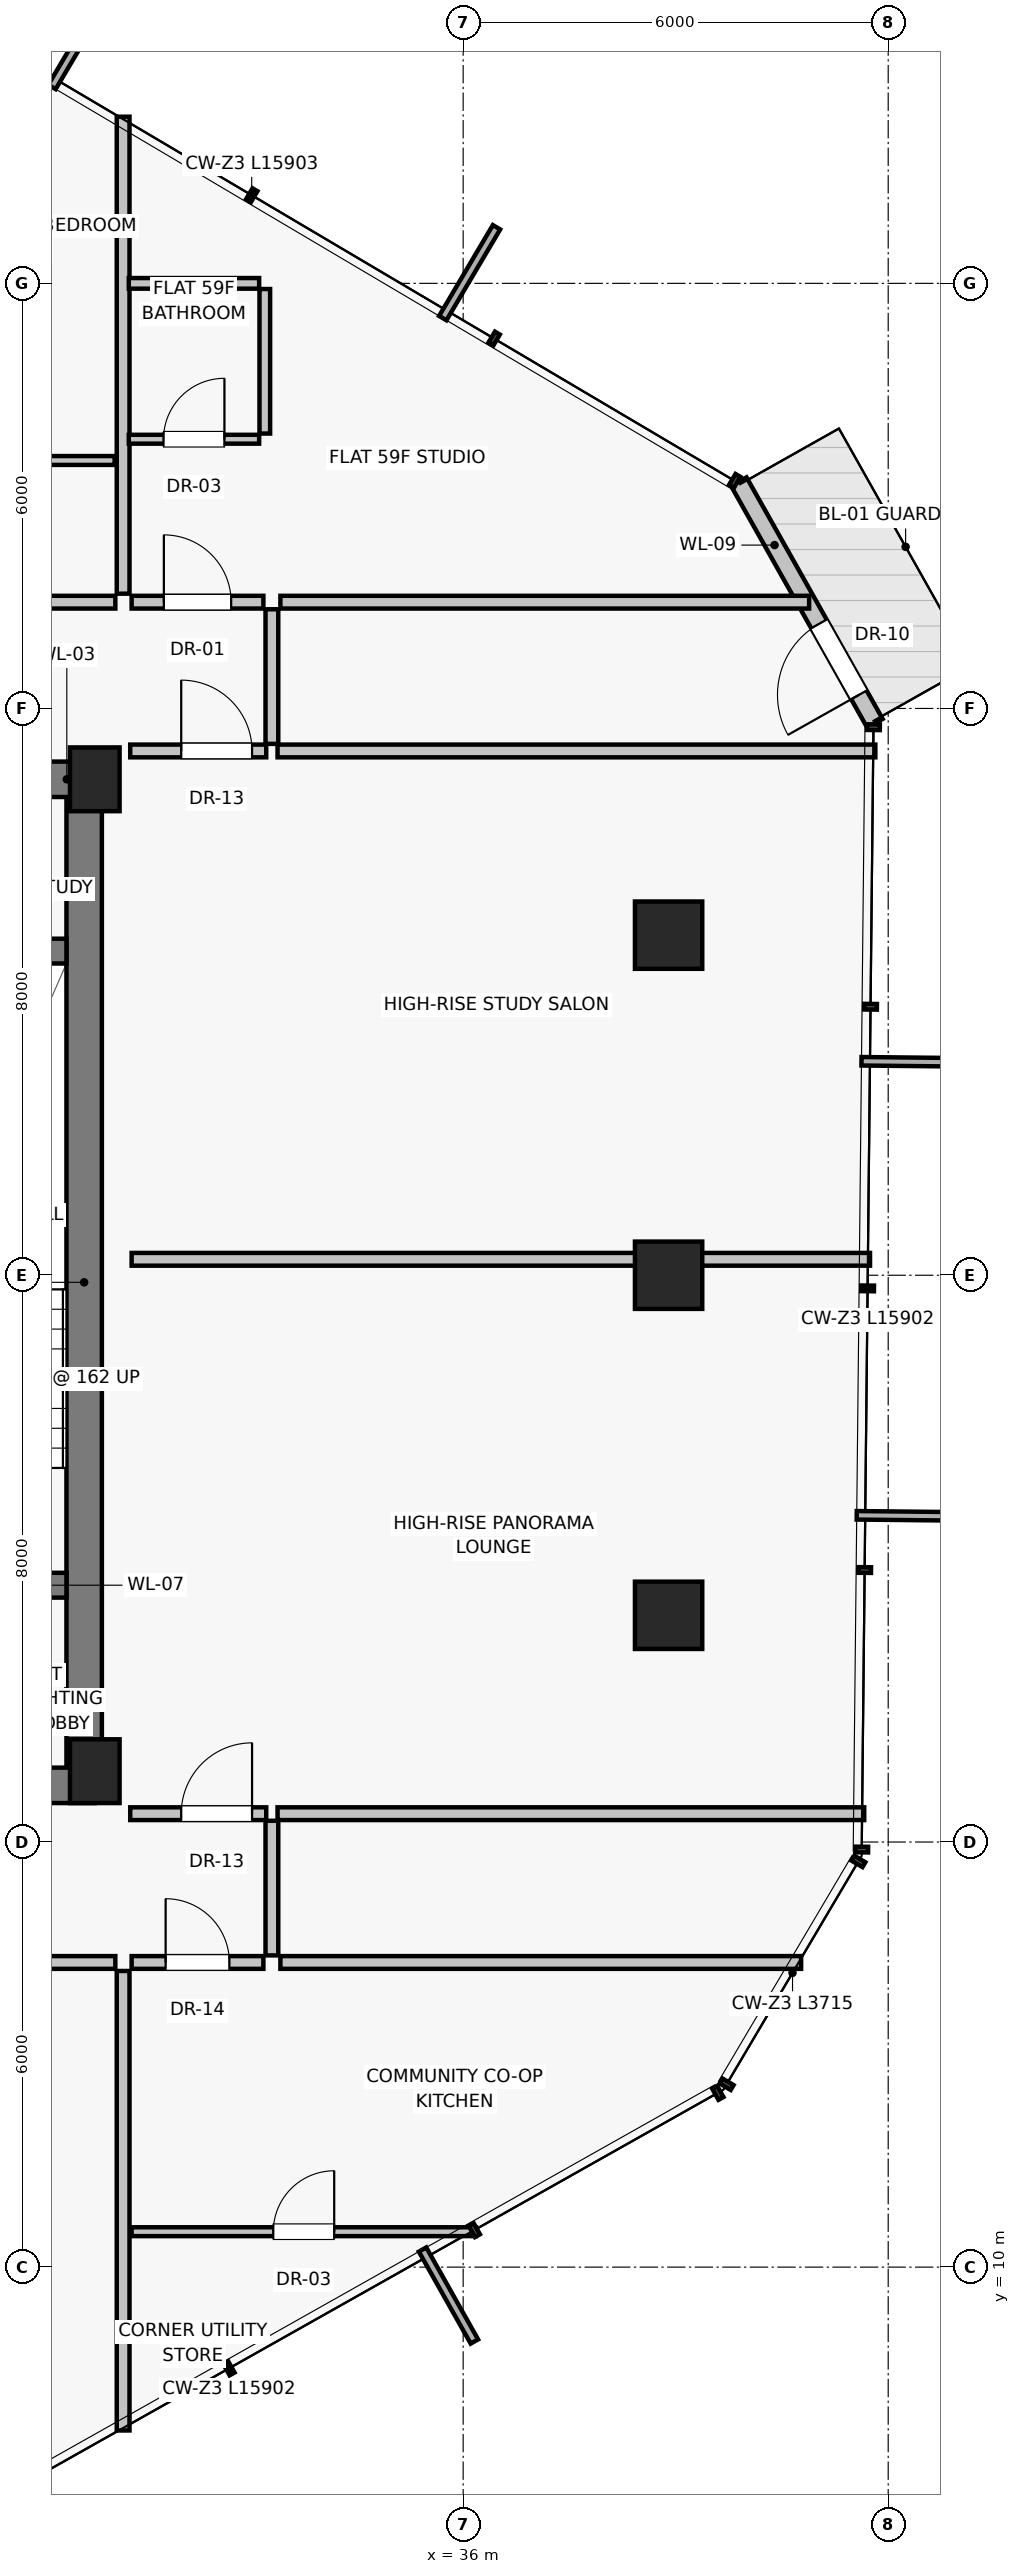
"""IFC4 building model, lengths in metres.
Left out: names, types, materials, properties, quantities, classifications, styles, units other than length and angle.
Written with IfcOpenShell. Run it as: python <this file> out.ifc"""

import sys

from ifc_helpers import new_model, si_unit, direction, frame, frame_2d, origin, origin_2d, place, context, subcontext, project, spatial, rectangle, extrude, source, transform, mapped, element, fill, save


model = new_model("IFC4")
c1 = context("Model", 3, precision=1e-05, world=origin(), true_north=direction((0.0, 1.0)))
c2 = subcontext(c1, "Body", "Model", "MODEL_VIEW")
j1 = project(units=[si_unit("LENGTHUNIT", "METRE"), si_unit("PLANEANGLEUNIT", "RADIAN")], contexts=[c1])
p1 = place(None, origin())
s1 = spatial("IfcSite", under=j1, at=p1, CompositionType="ELEMENT")
p2 = place(p1, origin())
s2 = spatial("IfcBuilding", under=s1, at=p2, CompositionType="ELEMENT")
p3 = place(p2, frame((0.0, 0.0, 208.1)))
s3 = spatial("IfcBuildingStorey", under=s2, at=p3, CompositionType="ELEMENT", Elevation=208.1)
for number, where, z_axis, x_axis in (
    (1, (30.8, 17.0, 0.0), (0.0, 0.0, 1.0), (1.0, 0.0, 0.0)),
    (2, (30.8, 31.0, 0.0), (0.0, 0.0, 1.0), (1.0, 0.0, 0.0)),
):
    element("IfcColumn", number, at=place(p3, frame(where, z_axis=z_axis, x_axis=x_axis)), inside=s3, PredefinedType="PILASTER", context=c2, shape_type="SweptSolid", body=[
        extrude(rectangle(XDim=0.7, YDim=0.9, at=origin_2d()), origin(), (0.0, 0.0, 1.0), 3.25),
    ])
for number, where, z_axis, x_axis in (
    (3, (38.9, 19.2, 0.0), (0.0, 0.0, 1.0), (1.0, 0.0, 0.0)),
    (4, (38.9, 24.0, 0.0), (0.0, 0.0, 1.0), (1.0, 0.0, 0.0)),
    (5, (38.9, 28.8, 0.0), (0.0, 0.0, 1.0), (1.0, 0.0, 0.0)),
):
    element("IfcColumn", number, at=place(p3, frame(where, z_axis=z_axis, x_axis=x_axis)), inside=s3, PredefinedType="COLUMN", context=c2, shape_type="SweptSolid", body=[
        extrude(rectangle(XDim=0.95, YDim=0.95, at=origin_2d()), origin(), (0.0, 0.0, 1.0), 3.25),
    ])
p4 = place(p3, frame((41.813, 31.791, 0.0), z_axis=(0.0, 0.0, 1.0), x_axis=(-0.490924417237, 0.871202167445, 0.0)))
e6 = element("IfcWall", 6, at=p4, inside=s3, PredefinedType="SOLIDWALL", context=c2, shape_type="SweptSolid", body=[
    extrude(rectangle(XDim=3.914, YDim=0.25, at=frame_2d((1.957, 0.0))), origin(), (0.0, 0.0, 1.0), 2.97),
])
p5 = place(p4, frame((0.46, 0.0, 0.0)))
e7 = element("IfcOpeningElement", 7, at=p5, cuts=e6, PredefinedType="OPENING", context=c2, shape_type="SweptSolid", body=[
    extrude(rectangle(XDim=1.15, YDim=2.25, at=frame_2d((0.575, 1.125))), frame((0.0, 0.135, 0.0), z_axis=(0.0, -1.0, 0.0), x_axis=(1.0, 0.0, 0.0)), (0.0, 0.0, 1.0), 0.27),
])
p6 = place(p3, frame((30.65, 16.8, 0.0), z_axis=(0.0, 0.0, 1.0), x_axis=(0.0, 1.0, 0.0)))
e8 = element("IfcWall", 8, at=p6, inside=s3, PredefinedType="SHEAR", context=c2, shape_type="SweptSolid", body=[
    extrude(rectangle(XDim=14.2, YDim=0.5, at=frame_2d((7.1, 0.0))), origin(), (0.0, 0.0, 1.0), 2.97),
])
p7 = place(p3, frame((24.95, 16.8, 0.0), z_axis=(0.0, 0.0, 1.0), x_axis=(1.0, 0.0, 0.0)))
e9 = element("IfcWall", 9, at=p7, inside=s3, PredefinedType="SHEAR", context=c2, shape_type="SweptSolid", body=[
    extrude(rectangle(XDim=5.85, YDim=0.5, at=frame_2d((2.925, 0.0))), origin(), (0.0, 0.0, 1.0), 2.97),
])
p8 = place(p7, frame((2.15, 0.0, 0.0)))
e10 = element("IfcOpeningElement", 10, at=p8, cuts=e9, PredefinedType="OPENING", context=c2, shape_type="SweptSolid", body=[
    extrude(rectangle(XDim=1.2, YDim=2.03, at=frame_2d((0.6, 1.015))), frame((0.0, 0.26, 0.0), z_axis=(0.0, -1.0, 0.0), x_axis=(1.0, 0.0, 0.0)), (0.0, 0.0, 1.0), 0.52),
])
p9 = place(p3, frame((27.0, 31.0, 0.0), z_axis=(0.0, 0.0, 1.0), x_axis=(1.0, 0.0, 0.0)))
e11 = element("IfcWall", 11, at=p9, inside=s3, PredefinedType="SHEAR", context=c2, shape_type="SweptSolid", body=[
    extrude(rectangle(XDim=3.8, YDim=0.5, at=frame_2d((1.9, 0.0))), origin(), (0.0, 0.0, 1.0), 2.97),
])
p10 = place(p9, frame((0.45, 0.0, 0.0)))
e12 = element("IfcOpeningElement", 12, at=p10, cuts=e11, PredefinedType="OPENING", context=c2, shape_type="SweptSolid", body=[
    extrude(rectangle(XDim=0.86, YDim=2.01, at=frame_2d((0.43, 1.005))), frame((0.0, 0.26, 0.0), z_axis=(0.0, -1.0, 0.0), x_axis=(1.0, 0.0, 0.0)), (0.0, 0.0, 1.0), 0.52),
])
p11 = place(p9, frame((1.9, 0.0, 0.0)))
e13 = element("IfcOpeningElement", 13, at=p11, cuts=e11, PredefinedType="OPENING", context=c2, shape_type="SweptSolid", body=[
    extrude(rectangle(XDim=0.86, YDim=2.01, at=frame_2d((0.43, 1.005))), frame((0.0, 0.26, 0.0), z_axis=(0.0, -1.0, 0.0), x_axis=(1.0, 0.0, 0.0)), (0.0, 0.0, 1.0), 0.52),
])
p12 = place(p3, frame((27.025, 19.625, 0.0), z_axis=(0.0, 0.0, 1.0), x_axis=(1.0, 0.0, 0.0)))
e14 = element("IfcWall", 14, at=p12, inside=s3, PredefinedType="SHEAR", context=c2, shape_type="SweptSolid", body=[
    extrude(rectangle(XDim=3.375, YDim=0.35, at=frame_2d((1.688, 0.0))), origin(), (0.0, 0.0, 1.0), 2.97),
])
p13 = place(p12, frame((1.05, 0.0, 0.0)))
e15 = element("IfcOpeningElement", 15, at=p13, cuts=e14, PredefinedType="OPENING", context=c2, shape_type="SweptSolid", body=[
    extrude(rectangle(XDim=1.1, YDim=2.03, at=frame_2d((0.55, 1.015))), frame((0.0, 0.185, 0.0), z_axis=(0.0, -1.0, 0.0), x_axis=(1.0, 0.0, 0.0)), (0.0, 0.0, 1.0), 0.37),
])
p14 = place(p3, frame((27.025, 28.575, 0.0), z_axis=(0.0, 0.0, 1.0), x_axis=(1.0, 0.0, 0.0)))
e16 = element("IfcWall", 16, at=p14, inside=s3, PredefinedType="SHEAR", context=c2, shape_type="SweptSolid", body=[
    extrude(rectangle(XDim=3.375, YDim=0.35, at=frame_2d((1.688, 0.0))), origin(), (0.0, 0.0, 1.0), 2.97),
])
p15 = place(p3, frame((31.2, 14.18, 0.0), z_axis=(0.0, 0.0, 1.0), x_axis=(0.0, -1.0, 0.0)))
e17 = element("IfcWall", 17, at=p15, inside=s3, PredefinedType="PARTITIONING", context=c2, shape_type="SweptSolid", body=[
    extrude(rectangle(XDim=6.486, YDim=0.18, at=frame_2d((3.243, 0.0))), origin(), (0.0, 0.0, 1.0), 2.97),
])
p16 = place(p3, frame((24.77, 14.3, 0.0), z_axis=(0.0, 0.0, 1.0), x_axis=(1.0, 0.0, 0.0)))
e18 = element("IfcWall", 18, at=p16, inside=s3, PredefinedType="PARTITIONING", context=c2, shape_type="SweptSolid", body=[
    extrude(rectangle(XDim=6.32, YDim=0.18, at=frame_2d((3.16, 0.0))), origin(), (0.0, 0.0, 1.0), 2.97),
])
p17 = place(p16, frame((3.878, 0.0, 0.0)))
e19 = element("IfcOpeningElement", 19, at=p17, cuts=e18, PredefinedType="OPENING", context=c2, shape_type="SweptSolid", body=[
    extrude(rectangle(XDim=0.95, YDim=2.02, at=frame_2d((0.475, 1.01))), frame((0.0, 0.1, 0.0), z_axis=(0.0, -1.0, 0.0), x_axis=(1.0, 0.0, 0.0)), (0.0, 0.0, 1.0), 0.2),
])
p18 = place(p3, frame((31.2, 33.62, 0.0), z_axis=(0.0, 0.0, 1.0), x_axis=(0.0, 1.0, 0.0)))
e20 = element("IfcWall", 20, at=p18, inside=s3, PredefinedType="PARTITIONING", context=c2, shape_type="SweptSolid", body=[
    extrude(rectangle(XDim=6.732, YDim=0.18, at=frame_2d((3.366, 0.0))), origin(), (0.0, 0.0, 1.0), 2.97),
])
p19 = place(p3, frame((24.88, 33.5, 0.0), z_axis=(0.0, 0.0, 1.0), x_axis=(1.0, 0.0, 0.0)))
e21 = element("IfcWall", 21, at=p19, inside=s3, PredefinedType="PARTITIONING", context=c2, shape_type="SweptSolid", body=[
    extrude(rectangle(XDim=6.21, YDim=0.18, at=frame_2d((3.105, 0.0))), origin(), (0.0, 0.0, 1.0), 2.97),
])
p20 = place(p19, frame((2.64, 0.0, 0.0)))
e22 = element("IfcOpeningElement", 22, at=p20, cuts=e21, PredefinedType="OPENING", context=c2, shape_type="SweptSolid", body=[
    extrude(rectangle(XDim=0.95, YDim=2.02, at=frame_2d((0.475, 1.01))), frame((0.0, 0.1, 0.0), z_axis=(0.0, -1.0, 0.0), x_axis=(1.0, 0.0, 0.0)), (0.0, 0.0, 1.0), 0.2),
])
p21 = place(p3, frame((29.07, 35.5, 0.0), z_axis=(0.0, 0.0, 1.0), x_axis=(1.0, 0.0, 0.0)))
e23 = element("IfcWall", 23, at=p21, inside=s3, PredefinedType="PARTITIONING", context=c2, shape_type="SweptSolid", body=[
    extrude(rectangle(XDim=2.01, YDim=0.125, at=frame_2d((1.005, 0.0))), origin(), (0.0, 0.0, 1.0), 2.617),
])
p22 = place(p3, frame((31.32, 24.225, 0.0), z_axis=(0.0, 0.0, 1.0), x_axis=(1.0, 0.0, 0.0)))
e24 = element("IfcWall", 24, at=p22, inside=s3, PredefinedType="PARTITIONING", context=c2, shape_type="SweptSolid", body=[
    extrude(rectangle(XDim=10.423, YDim=0.18, at=frame_2d((5.212, 0.0))), origin(), (0.0, 0.0, 1.0), 2.97),
])
p23 = place(p3, frame((33.3, 14.4, 0.0), z_axis=(0.0, 0.0, 1.0), x_axis=(0.0, 1.0, 0.0)))
e25 = element("IfcWall", 25, at=p23, inside=s3, PredefinedType="PARTITIONING", context=c2, shape_type="SweptSolid", body=[
    extrude(rectangle(XDim=1.9, YDim=0.18, at=frame_2d((0.95, 0.0))), origin(), (0.0, 0.0, 1.0), 2.97),
])
p24 = place(p3, frame((33.3, 31.5, 0.0), z_axis=(0.0, 0.0, 1.0), x_axis=(0.0, 1.0, 0.0)))
e26 = element("IfcWall", 26, at=p24, inside=s3, PredefinedType="PARTITIONING", context=c2, shape_type="SweptSolid", body=[
    extrude(rectangle(XDim=1.9, YDim=0.18, at=frame_2d((0.95, 0.0))), origin(), (0.0, 0.0, 1.0), 2.97),
])
p25 = place(p3, frame((31.3, 16.4, 0.0), z_axis=(0.0, 0.0, 1.0), x_axis=(1.0, 0.0, 0.0)))
e27 = element("IfcWall", 27, at=p25, inside=s3, PredefinedType="PARTITIONING", context=c2, shape_type="SweptSolid", body=[
    extrude(rectangle(XDim=1.92, YDim=0.18, at=frame_2d((0.96, 0.0))), origin(), (0.0, 0.0, 1.0), 2.97),
])
p26 = place(p25, frame((0.72, 0.0, 0.0)))
e28 = element("IfcOpeningElement", 28, at=p26, cuts=e27, PredefinedType="OPENING", context=c2, shape_type="SweptSolid", body=[
    extrude(rectangle(XDim=1.0, YDim=2.01, at=frame_2d((0.5, 1.005))), frame((0.0, 0.1, 0.0), z_axis=(0.0, -1.0, 0.0), x_axis=(1.0, 0.0, 0.0)), (0.0, 0.0, 1.0), 0.2),
])
p27 = place(p3, frame((33.38, 16.4, 0.0), z_axis=(0.0, 0.0, 1.0), x_axis=(1.0, 0.0, 0.0)))
e29 = element("IfcWall", 29, at=p27, inside=s3, PredefinedType="PARTITIONING", context=c2, shape_type="SweptSolid", body=[
    extrude(rectangle(XDim=8.282, YDim=0.18, at=frame_2d((4.141, 0.0))), origin(), (0.0, 0.0, 1.0), 2.97),
])
p28 = place(p3, frame((31.3, 31.4, 0.0), z_axis=(0.0, 0.0, 1.0), x_axis=(1.0, 0.0, 0.0)))
e30 = element("IfcWall", 30, at=p28, inside=s3, PredefinedType="PARTITIONING", context=c2, shape_type="SweptSolid", body=[
    extrude(rectangle(XDim=1.92, YDim=0.18, at=frame_2d((0.96, 0.0))), origin(), (0.0, 0.0, 1.0), 2.97),
])
p29 = place(p28, frame((0.72, 0.0, 0.0)))
e31 = element("IfcOpeningElement", 31, at=p29, cuts=e30, PredefinedType="OPENING", context=c2, shape_type="SweptSolid", body=[
    extrude(rectangle(XDim=1.0, YDim=2.01, at=frame_2d((0.5, 1.005))), frame((0.0, 0.1, 0.0), z_axis=(0.0, -1.0, 0.0), x_axis=(1.0, 0.0, 0.0)), (0.0, 0.0, 1.0), 0.2),
])
p30 = place(p3, frame((33.38, 31.4, 0.0), z_axis=(0.0, 0.0, 1.0), x_axis=(1.0, 0.0, 0.0)))
e32 = element("IfcWall", 32, at=p30, inside=s3, PredefinedType="PARTITIONING", context=c2, shape_type="SweptSolid", body=[
    extrude(rectangle(XDim=8.439, YDim=0.18, at=frame_2d((4.219, 0.0))), origin(), (0.0, 0.0, 1.0), 2.97),
])
p31 = place(p3, frame((33.42, 14.3, 0.0), z_axis=(0.0, 0.0, 1.0), x_axis=(1.0, 0.0, 0.0)))
e33 = element("IfcWall", 33, at=p31, inside=s3, PredefinedType="PARTITIONING", context=c2, shape_type="SweptSolid", body=[
    extrude(rectangle(XDim=7.351, YDim=0.18, at=frame_2d((3.676, 0.0))), origin(), (0.0, 0.0, 1.0), 2.97),
])
p32 = place(p3, frame((31.32, 14.3, 0.0), z_axis=(0.0, 0.0, 1.0), x_axis=(1.0, 0.0, 0.0)))
e34 = element("IfcWall", 34, at=p32, inside=s3, PredefinedType="PARTITIONING", context=c2, shape_type="SweptSolid", body=[
    extrude(rectangle(XDim=1.86, YDim=0.18, at=frame_2d((0.93, 0.0))), origin(), (0.0, 0.0, 1.0), 2.97),
])
p33 = place(p32, frame((0.48, 0.0, 0.0)))
e35 = element("IfcOpeningElement", 35, at=p33, cuts=e34, PredefinedType="OPENING", context=c2, shape_type="SweptSolid", body=[
    extrude(rectangle(XDim=0.9, YDim=2.01, at=frame_2d((0.45, 1.005))), frame((0.0, 0.1, 0.0), z_axis=(0.0, -1.0, 0.0), x_axis=(1.0, 0.0, 0.0)), (0.0, 0.0, 1.0), 0.2),
])
p34 = place(p3, frame((31.32, 10.5, 0.0), z_axis=(0.0, 0.0, 1.0), x_axis=(1.0, 0.0, 0.0)))
e36 = element("IfcWall", 36, at=p34, inside=s3, PredefinedType="PARTITIONING", context=c2, shape_type="SweptSolid", body=[
    extrude(rectangle(XDim=4.859, YDim=0.125, at=frame_2d((2.43, 0.0))), origin(), (0.0, 0.0, 1.0), 2.97),
])
p35 = place(p34, frame((2.0, 0.0, 0.0)))
e37 = element("IfcOpeningElement", 37, at=p35, cuts=e36, PredefinedType="OPENING", context=c2, shape_type="SweptSolid", body=[
    extrude(rectangle(XDim=0.86, YDim=2.01, at=frame_2d((0.43, 1.005))), frame((0.0, 0.073, 0.0), z_axis=(0.0, -1.0, 0.0), x_axis=(1.0, 0.0, 0.0)), (0.0, 0.0, 1.0), 0.145),
])
p36 = place(p3, frame((33.42, 33.5, 0.0), z_axis=(0.0, 0.0, 1.0), x_axis=(1.0, 0.0, 0.0)))
e38 = element("IfcWall", 38, at=p36, inside=s3, PredefinedType="PARTITIONING", context=c2, shape_type="SweptSolid", body=[
    extrude(rectangle(XDim=7.464, YDim=0.18, at=frame_2d((3.732, 0.0))), origin(), (0.0, 0.0, 1.0), 2.97),
])
p37 = place(p3, frame((31.32, 33.5, 0.0), z_axis=(0.0, 0.0, 1.0), x_axis=(1.0, 0.0, 0.0)))
e39 = element("IfcWall", 39, at=p37, inside=s3, PredefinedType="PARTITIONING", context=c2, shape_type="SweptSolid", body=[
    extrude(rectangle(XDim=1.86, YDim=0.18, at=frame_2d((0.93, 0.0))), origin(), (0.0, 0.0, 1.0), 2.97),
])
p38 = place(p37, frame((0.455, 0.0, 0.0)))
e40 = element("IfcOpeningElement", 40, at=p38, cuts=e39, PredefinedType="OPENING", context=c2, shape_type="SweptSolid", body=[
    extrude(rectangle(XDim=0.95, YDim=2.02, at=frame_2d((0.475, 1.01))), frame((0.0, 0.1, 0.0), z_axis=(0.0, -1.0, 0.0), x_axis=(1.0, 0.0, 0.0)), (0.0, 0.0, 1.0), 0.2),
])
p39 = place(p3, frame((31.28, 35.8, 0.0), z_axis=(0.0, 0.0, 1.0), x_axis=(1.0, 0.0, 0.0)))
e41 = element("IfcWall", 41, at=p39, inside=s3, PredefinedType="PARTITIONING", context=c2, shape_type="SweptSolid", body=[
    extrude(rectangle(XDim=1.84, YDim=0.125, at=frame_2d((0.92, 0.0))), origin(), (0.0, 0.0, 1.0), 2.97),
])
p40 = place(p39, frame((0.49, 0.0, 0.0)))
e42 = element("IfcOpeningElement", 42, at=p40, cuts=e41, PredefinedType="OPENING", context=c2, shape_type="SweptSolid", body=[
    extrude(rectangle(XDim=0.86, YDim=2.01, at=frame_2d((0.43, 1.005))), frame((0.0, 0.073, 0.0), z_axis=(0.0, -1.0, 0.0), x_axis=(1.0, 0.0, 0.0)), (0.0, 0.0, 1.0), 0.145),
])
p41 = place(p3, frame((31.28, 38.0, 0.0), z_axis=(0.0, 0.0, 1.0), x_axis=(1.0, 0.0, 0.0)))
e43 = element("IfcWall", 43, at=p41, inside=s3, PredefinedType="PARTITIONING", context=c2, shape_type="SweptSolid", body=[
    extrude(rectangle(XDim=1.84, YDim=0.15, at=frame_2d((0.92, 0.0))), origin(), (0.0, 0.0, 1.0), 2.97),
])
p42 = place(p3, frame((33.2, 35.88, 0.0), z_axis=(0.0, 0.0, 1.0), x_axis=(0.0, 1.0, 0.0)))
e44 = element("IfcWall", 44, at=p42, inside=s3, PredefinedType="PARTITIONING", context=c2, shape_type="SweptSolid", body=[
    extrude(rectangle(XDim=2.04, YDim=0.15, at=frame_2d((1.02, 0.0))), origin(), (0.0, 0.0, 1.0), 2.97),
])
m1 = source(origin(), c2, "Body", "SweptSolid", [
    extrude(rectangle(XDim=1.15, YDim=2.25, at=frame_2d((0.575, 1.125))), frame((0.0, 0.025, 0.0), z_axis=(0.0, -1.0, 0.0), x_axis=(1.0, 0.0, 0.0)), (0.0, 0.0, 1.0), 0.05),
])
p43 = place(p5, frame((1.15, 0.0, 0.0), z_axis=(0.0, 0.0, 1.0), x_axis=(-1.0, 0.0, 0.0)))
e45 = element("IfcDoor", 45, at=p43, inside=s3, OperationType="SINGLE_SWING_LEFT", PredefinedType="DOOR", context=c2, shape_type="MappedRepresentation", body=[
    mapped(m1, transform((0.0, 0.0, 0.0), scale=1.0)),
])
fill(e7, e45)
m2 = source(origin(), c2, "Body", "SweptSolid", [
    extrude(rectangle(XDim=1.0, YDim=2.01, at=frame_2d((0.5, 1.005))), frame((0.0, 0.025, 0.0), z_axis=(0.0, -1.0, 0.0), x_axis=(1.0, 0.0, 0.0)), (0.0, 0.0, 1.0), 0.05),
])
p44 = place(p26, origin())
e46 = element("IfcDoor", 46, at=p44, inside=s3, OperationType="SINGLE_SWING_RIGHT", PredefinedType="DOOR", context=c2, shape_type="MappedRepresentation", body=[
    mapped(m2, transform((0.0, 0.0, 0.0), scale=1.0)),
])
fill(e28, e46)
p45 = place(p29, origin())
e47 = element("IfcDoor", 47, at=p45, inside=s3, OperationType="SINGLE_SWING_LEFT", PredefinedType="DOOR", context=c2, shape_type="MappedRepresentation", body=[
    mapped(m2, transform((0.0, 0.0, 0.0), scale=1.0)),
])
fill(e31, e47)
m3 = source(origin(), c2, "Body", "SweptSolid", [
    extrude(rectangle(XDim=0.9, YDim=2.01, at=frame_2d((0.45, 1.005))), frame((0.0, 0.025, 0.0), z_axis=(0.0, -1.0, 0.0), x_axis=(1.0, 0.0, 0.0)), (0.0, 0.0, 1.0), 0.05),
])
p46 = place(p33, origin())
e48 = element("IfcDoor", 48, at=p46, inside=s3, OperationType="SINGLE_SWING_LEFT", PredefinedType="DOOR", context=c2, shape_type="MappedRepresentation", body=[
    mapped(m3, transform((0.0, 0.0, 0.0), scale=1.0)),
])
fill(e35, e48)
m4 = source(origin(), c2, "Body", "SweptSolid", [
    extrude(rectangle(XDim=0.86, YDim=2.01, at=frame_2d((0.43, 1.005))), frame((0.0, 0.025, 0.0), z_axis=(0.0, -1.0, 0.0), x_axis=(1.0, 0.0, 0.0)), (0.0, 0.0, 1.0), 0.05),
])
p47 = place(p35, origin())
e49 = element("IfcDoor", 49, at=p47, inside=s3, OperationType="SINGLE_SWING_RIGHT", PredefinedType="DOOR", context=c2, shape_type="MappedRepresentation", body=[
    mapped(m4, transform((0.0, 0.0, 0.0), scale=1.0)),
])
fill(e37, e49)
m5 = source(origin(), c2, "Body", "SweptSolid", [
    extrude(rectangle(XDim=0.95, YDim=2.02, at=frame_2d((0.475, 1.01))), frame((0.0, 0.025, 0.0), z_axis=(0.0, -1.0, 0.0), x_axis=(1.0, 0.0, 0.0)), (0.0, 0.0, 1.0), 0.05),
])
p48 = place(p38, origin())
e50 = element("IfcDoor", 50, at=p48, inside=s3, OperationType="SINGLE_SWING_LEFT", PredefinedType="DOOR", context=c2, shape_type="MappedRepresentation", body=[
    mapped(m5, transform((0.0, 0.0, 0.0), scale=1.0)),
])
fill(e40, e50)
p49 = place(p40, origin())
e51 = element("IfcDoor", 51, at=p49, inside=s3, OperationType="SINGLE_SWING_RIGHT", PredefinedType="DOOR", context=c2, shape_type="MappedRepresentation", body=[
    mapped(m4, transform((0.0, 0.0, 0.0), scale=1.0)),
])
fill(e42, e51)
save(model, sys.argv[1])
